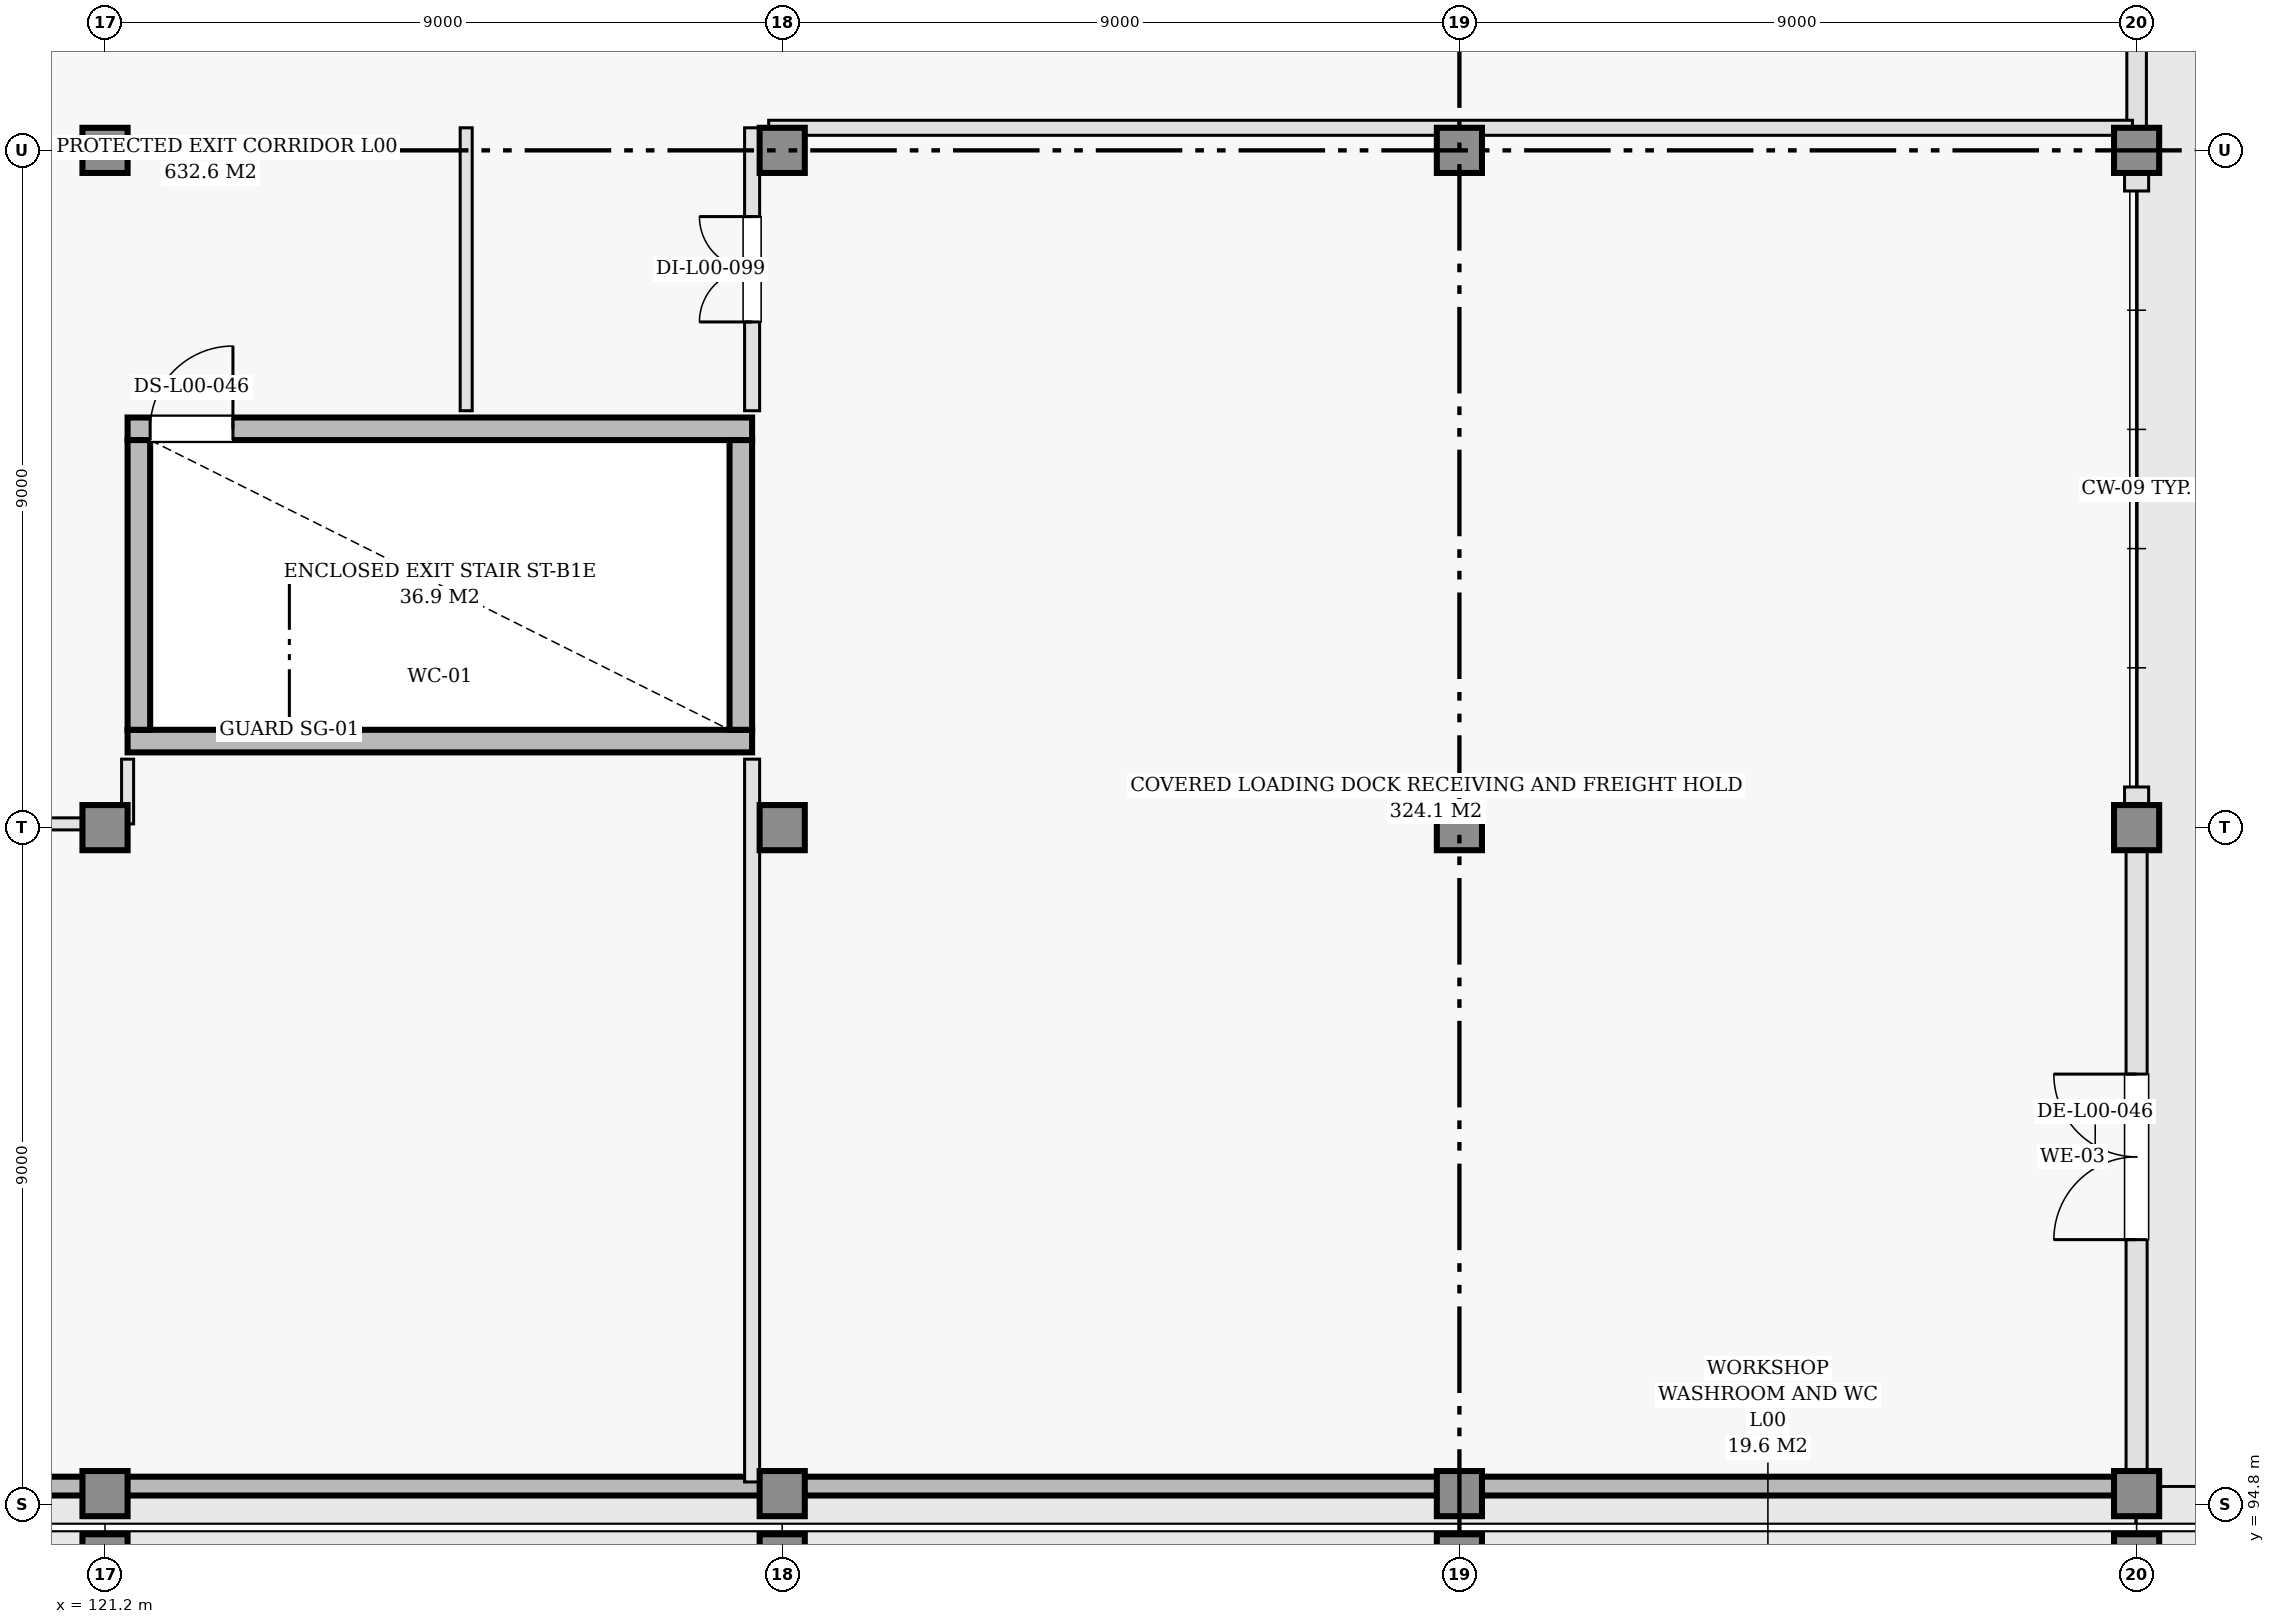
"""IFC4 building model, lengths in metres.
Left out: names, types, materials, properties, quantities, classifications, styles, units other than length and angle.
Written with IfcOpenShell. Run it as: python <this file> out.ifc"""

import sys

from ifc_helpers import new_model, si_unit, direction, frame, frame_2d, origin, origin_2d, place, context, subcontext, project, spatial, rectangle, extrude, element, fill, save


model = new_model("IFC4")
c1 = context("Model", 3, precision=1e-05, world=origin(), true_north=direction((0.0, 1.0)))
c2 = subcontext(c1, "Body", "Model", "MODEL_VIEW")
j1 = project(units=[si_unit("LENGTHUNIT", "METRE"), si_unit("PLANEANGLEUNIT", "RADIAN")], contexts=[c1])
p1 = place(None, origin())
s1 = spatial("IfcSite", under=j1, at=p1, CompositionType="ELEMENT")
p2 = place(p1, origin())
s2 = spatial("IfcBuilding", under=s1, at=p2, CompositionType="ELEMENT")
p3 = place(p2, origin())
s3 = spatial("IfcBuildingStorey", under=s2, at=p3, CompositionType="ELEMENT", Elevation=0.0)
for number, where, z_axis, x_axis in (
    (1, (121.2, 94.2, 0.0), (0.0, 0.0, 1.0), (1.0, 0.0, 0.0)),
    (2, (130.2, 94.2, 0.0), (0.0, 0.0, 1.0), (1.0, 0.0, 0.0)),
    (3, (139.2, 94.2, 0.0), (0.0, 0.0, 1.0), (1.0, 0.0, 0.0)),
    (4, (148.2, 94.2, 0.0), (0.0, 0.0, 1.0), (1.0, 0.0, 0.0)),
):
    element("IfcColumn", number, at=place(p3, frame(where, z_axis=z_axis, x_axis=x_axis)), inside=s3, PredefinedType="COLUMN", context=c2, shape_type="SweptSolid", body=[
        extrude(rectangle(XDim=0.42, YDim=0.42, at=origin_2d()), origin(), (0.0, 0.0, 1.0), 4.8),
    ])
for number, where, z_axis, x_axis in (
    (5, (121.2, 94.95, 0.0), (0.0, 0.0, 1.0), (1.0, 0.0, 0.0)),
    (6, (121.2, 103.8, 0.0), (0.0, 0.0, 1.0), (1.0, 0.0, 0.0)),
    (7, (121.2, 112.8, 0.0), (0.0, 0.0, 1.0), (1.0, 0.0, 0.0)),
    (8, (130.2, 94.95, 0.0), (0.0, 0.0, 1.0), (1.0, 0.0, 0.0)),
    (9, (130.2, 103.8, 0.0), (0.0, 0.0, 1.0), (1.0, 0.0, 0.0)),
    (10, (130.2, 112.8, 0.0), (0.0, 0.0, 1.0), (1.0, 0.0, 0.0)),
    (11, (139.2, 94.95, 0.0), (0.0, 0.0, 1.0), (1.0, 0.0, 0.0)),
    (12, (139.2, 103.8, 0.0), (0.0, 0.0, 1.0), (1.0, 0.0, 0.0)),
    (13, (139.2, 112.8, 0.0), (0.0, 0.0, 1.0), (1.0, 0.0, 0.0)),
    (14, (148.2, 94.95, 0.0), (0.0, 0.0, 1.0), (1.0, 0.0, 0.0)),
    (15, (148.2, 103.8, 0.0), (0.0, 0.0, 1.0), (1.0, 0.0, 0.0)),
    (16, (148.2, 112.8, 0.0), (0.0, 0.0, 1.0), (1.0, 0.0, 0.0)),
):
    element("IfcColumn", number, at=place(p3, frame(where, z_axis=z_axis, x_axis=x_axis)), inside=s3, PredefinedType="COLUMN", context=c2, shape_type="SweptSolid", body=[
        extrude(rectangle(XDim=0.6, YDim=0.6, at=origin_2d()), origin(), (0.0, 0.0, 1.0), 4.8),
    ])
p4 = place(p3, frame((111.6, 95.05, 0.0), z_axis=(0.0, 0.0, 1.0), x_axis=(1.0, 0.0, 0.0)))
e17 = element("IfcWall", 17, at=p4, inside=s3, PredefinedType="SHEAR", context=c2, shape_type="SweptSolid", body=[
    extrude(rectangle(XDim=36.6, YDim=0.25, at=frame_2d((18.3, 0.0))), origin(), (0.0, 0.0, 1.0), 4.52),
])
p5 = place(p3, frame((148.2, 95.05, 0.0), z_axis=(0.0, 0.0, 1.0), x_axis=(0.0, 1.0, 0.0)))
e18 = element("IfcWall", 18, at=p5, inside=s3, PredefinedType="SOLIDWALL", context=c2, shape_type="SweptSolid", body=[
    extrude(rectangle(XDim=8.75, YDim=0.28, at=frame_2d((4.375, 0.0))), origin(), (0.0, 0.0, 1.0), 3.285),
])
p6 = place(p5, frame((3.275, 0.0, 0.0)))
e19 = element("IfcOpeningElement", 19, at=p6, cuts=e18, PredefinedType="OPENING", context=c2, shape_type="SweptSolid", body=[
    extrude(rectangle(XDim=2.2, YDim=2.35, at=frame_2d((1.1, 1.175))), frame((0.0, 0.15, 0.0), z_axis=(0.0, -1.0, 0.0), x_axis=(1.0, 0.0, 0.0)), (0.0, 0.0, 1.0), 0.3),
])
for number, where, z_axis, x_axis in (
    (20, (148.2, 103.8, 0.0), (0.0, 0.0, 1.0), (0.0, 1.0, 0.0)),
    (21, (148.2, 112.26, 0.0), (0.0, 0.0, 1.0), (0.0, 1.0, 0.0)),
):
    element("IfcWall", number, at=place(p3, frame(where, z_axis=z_axis, x_axis=x_axis)), inside=s3, PredefinedType="SOLIDWALL", context=c2, shape_type="SweptSolid", body=[
        extrude(rectangle(XDim=0.54, YDim=0.32, at=frame_2d((0.27, 0.0))), origin(), (0.0, 0.0, 1.0), 3.285),
    ])
p7 = place(p3, frame((148.2, 112.8, 0.0), z_axis=(0.0, 0.0, 1.0), x_axis=(0.0, 1.0, 0.0)))
e22 = element("IfcWall", 22, at=p7, inside=s3, PredefinedType="SOLIDWALL", context=c2, shape_type="SweptSolid", body=[
    extrude(rectangle(XDim=9.0, YDim=0.26, at=frame_2d((4.5, 0.0))), origin(), (0.0, 0.0, 1.0), 3.285),
])
p8 = place(p7, frame((4.85, 0.0, 0.0)))
e23 = element("IfcOpeningElement", 23, at=p8, cuts=e22, PredefinedType="OPENING", context=c2, shape_type="SweptSolid", body=[
    extrude(rectangle(XDim=2.0, YDim=2.3, at=frame_2d((1.0, 1.15))), frame((0.0, 0.14, 0.0), z_axis=(0.0, -1.0, 0.0), x_axis=(1.0, 0.0, 0.0)), (0.0, 0.0, 1.0), 0.28),
])
p9 = place(p3, frame((121.5, 104.95, 0.0), z_axis=(0.0, 0.0, 1.0), x_axis=(1.0, 0.0, 0.0)))
e24 = element("IfcWall", 24, at=p9, inside=s3, PredefinedType="SHEAR", context=c2, shape_type="SweptSolid", body=[
    extrude(rectangle(XDim=8.3, YDim=0.3, at=frame_2d((4.15, 0.0))), origin(), (0.0, 0.0, 1.0), 4.6),
])
p10 = place(p3, frame((121.5, 109.1, 0.0), z_axis=(0.0, 0.0, 1.0), x_axis=(1.0, 0.0, 0.0)))
e25 = element("IfcWall", 25, at=p10, inside=s3, PredefinedType="SHEAR", context=c2, shape_type="SweptSolid", body=[
    extrude(rectangle(XDim=8.3, YDim=0.3, at=frame_2d((4.15, 0.0))), origin(), (0.0, 0.0, 1.0), 4.6),
])
p11 = place(p10, frame((0.3, 0.0, 0.0)))
e26 = element("IfcOpeningElement", 26, at=p11, cuts=e25, PredefinedType="OPENING", context=c2, shape_type="SweptSolid", body=[
    extrude(rectangle(XDim=1.1, YDim=2.15, at=frame_2d((0.55, 1.075))), frame((0.0, 0.16, 0.0), z_axis=(0.0, -1.0, 0.0), x_axis=(1.0, 0.0, 0.0)), (0.0, 0.0, 1.0), 0.32),
])
for number, where, z_axis, x_axis in (
    (27, (121.65, 105.1, 0.0), (0.0, 0.0, 1.0), (0.0, 1.0, 0.0)),
    (28, (129.65, 105.1, 0.0), (0.0, 0.0, 1.0), (0.0, 1.0, 0.0)),
):
    element("IfcWall", number, at=place(p3, frame(where, z_axis=z_axis, x_axis=x_axis)), inside=s3, PredefinedType="SHEAR", context=c2, shape_type="SweptSolid", body=[
        extrude(rectangle(XDim=3.85, YDim=0.3, at=frame_2d((1.925, 0.0))), origin(), (0.0, 0.0, 1.0), 4.6),
    ])
p12 = place(p3, frame((129.8, 109.34, 0.0), z_axis=(0.0, 0.0, 1.0), x_axis=(0.0, 1.0, 0.0)))
e29 = element("IfcWall", 29, at=p12, inside=s3, PredefinedType="PARTITIONING", context=c2, shape_type="SweptSolid", body=[
    extrude(rectangle(XDim=3.76, YDim=0.2, at=frame_2d((1.88, 0.0))), origin(), (0.0, 0.0, 1.0), 3.755),
])
p13 = place(p12, frame((1.18, 0.0, 0.0)))
e30 = element("IfcOpeningElement", 30, at=p13, cuts=e29, PredefinedType="OPENING", context=c2, shape_type="SweptSolid", body=[
    extrude(rectangle(XDim=1.4, YDim=2.15, at=frame_2d((0.7, 1.075))), frame((0.0, 0.11, 0.0), z_axis=(0.0, -1.0, 0.0), x_axis=(1.0, 0.0, 0.0)), (0.0, 0.0, 1.0), 0.22),
])
p14 = place(p3, frame((130.02, 113.1, 0.0), z_axis=(0.0, 0.0, 1.0), x_axis=(1.0, 0.0, 0.0)))
e31 = element("IfcWall", 31, at=p14, inside=s3, PredefinedType="PARTITIONING", context=c2, shape_type="SweptSolid", body=[
    extrude(rectangle(XDim=18.125, YDim=0.2, at=frame_2d((9.062, 0.0))), origin(), (0.0, 0.0, 1.0), 3.755),
])
p15 = place(p3, frame((129.8, 95.105, 0.0), z_axis=(0.0, 0.0, 1.0), x_axis=(0.0, 1.0, 0.0)))
e32 = element("IfcWall", 32, at=p15, inside=s3, PredefinedType="PARTITIONING", context=c2, shape_type="SweptSolid", body=[
    extrude(rectangle(XDim=9.605, YDim=0.2, at=frame_2d((4.802, 0.0))), origin(), (0.0, 0.0, 1.0), 3.755),
])
p16 = place(p3, frame((126.0, 109.34, 0.0), z_axis=(0.0, 0.0, 1.0), x_axis=(0.0, 1.0, 0.0)))
e33 = element("IfcWall", 33, at=p16, inside=s3, PredefinedType="PARTITIONING", context=c2, shape_type="SweptSolid", body=[
    extrude(rectangle(XDim=3.76, YDim=0.16, at=frame_2d((1.88, 0.0))), origin(), (0.0, 0.0, 1.0), 3.755),
])
p17 = place(p3, frame((121.5, 103.85, 0.0), z_axis=(0.0, 0.0, 1.0), x_axis=(0.0, 1.0, 0.0)))
e34 = element("IfcWall", 34, at=p17, inside=s3, PredefinedType="PARTITIONING", context=c2, shape_type="SweptSolid", body=[
    extrude(rectangle(XDim=0.86, YDim=0.16, at=frame_2d((0.43, 0.0))), origin(), (0.0, 0.0, 1.0), 3.755),
])
p18 = place(p3, frame((119.42, 103.85, 0.0), z_axis=(0.0, 0.0, 1.0), x_axis=(1.0, 0.0, 0.0)))
e35 = element("IfcWall", 35, at=p18, inside=s3, PredefinedType="PARTITIONING", context=c2, shape_type="SweptSolid", body=[
    extrude(rectangle(XDim=1.86, YDim=0.16, at=frame_2d((0.93, 0.0))), origin(), (0.0, 0.0, 1.0), 3.605),
])
p19 = place(p6, origin())
e36 = element("IfcDoor", 36, at=p19, inside=s3, OperationType="DOUBLE_DOOR_SINGLE_SWING", PredefinedType="DOOR", context=c2, shape_type="SweptSolid", body=[
    extrude(rectangle(XDim=2.2, YDim=2.35, at=frame_2d((1.1, 1.175))), frame((0.0, 0.025, 0.0), z_axis=(0.0, -1.0, 0.0), x_axis=(1.0, 0.0, 0.0)), (0.0, 0.0, 1.0), 0.05),
])
fill(e19, e36)
p20 = place(p11, origin())
e37 = element("IfcDoor", 37, at=p20, inside=s3, OperationType="SINGLE_SWING_RIGHT", PredefinedType="DOOR", context=c2, shape_type="SweptSolid", body=[
    extrude(rectangle(XDim=1.1, YDim=2.15, at=frame_2d((0.55, 1.075))), frame((0.0, 0.025, 0.0), z_axis=(0.0, -1.0, 0.0), x_axis=(1.0, 0.0, 0.0)), (0.0, 0.0, 1.0), 0.05),
])
fill(e26, e37)
p21 = place(p13, origin())
e38 = element("IfcDoor", 38, at=p21, inside=s3, OperationType="DOUBLE_DOOR_SINGLE_SWING", PredefinedType="DOOR", context=c2, shape_type="SweptSolid", body=[
    extrude(rectangle(XDim=1.4, YDim=2.15, at=frame_2d((0.7, 1.075))), frame((0.0, 0.025, 0.0), z_axis=(0.0, -1.0, 0.0), x_axis=(1.0, 0.0, 0.0)), (0.0, 0.0, 1.0), 0.05),
])
fill(e30, e38)
save(model, sys.argv[1])
